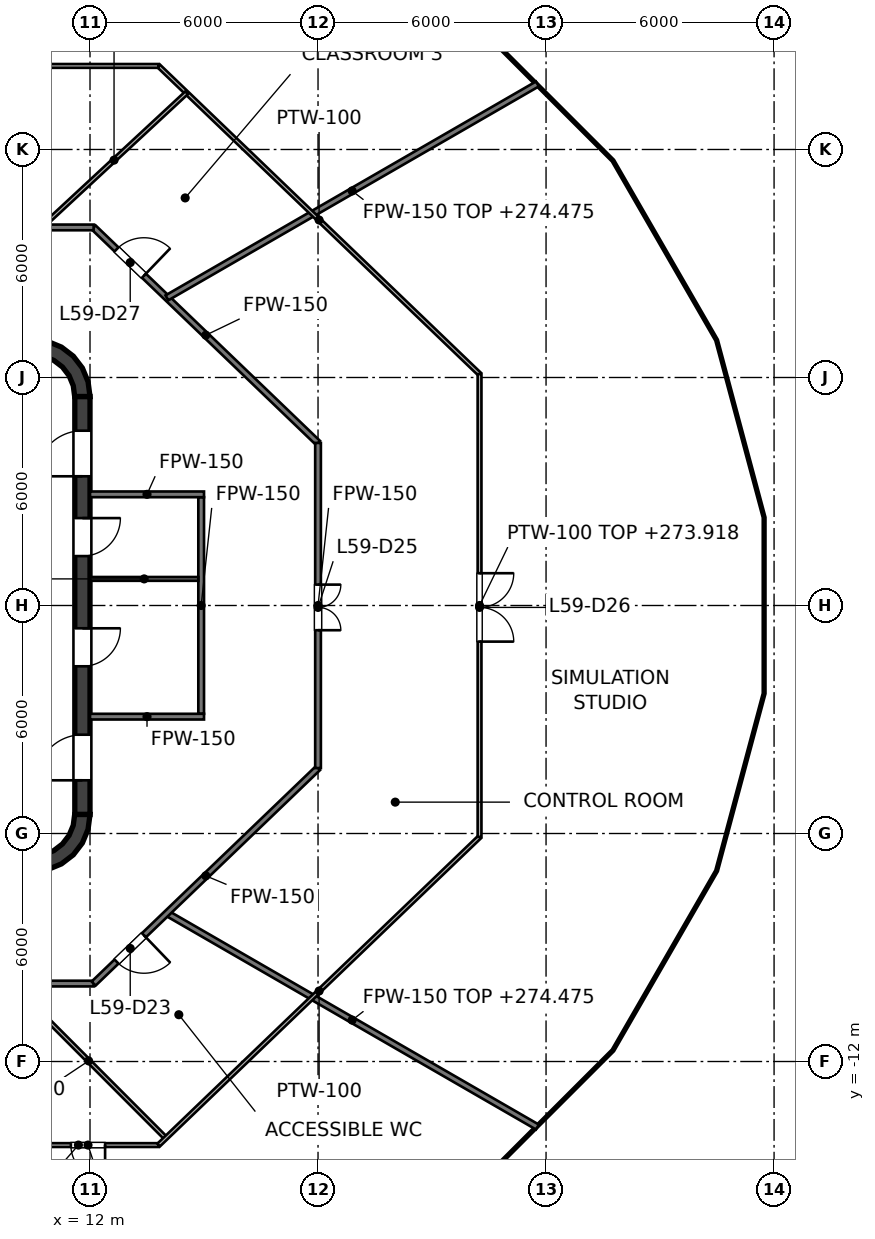
"""IFC4 building model, lengths in metres.
Left out: names, types, materials, properties, quantities, classifications, styles, units other than length and angle.
Written with IfcOpenShell. Run it as: python <this file> out.ifc"""

import sys

from ifc_helpers import new_model, si_unit, direction, frame, frame_2d, origin, place, context, subcontext, project, spatial, polyline, rectangle, outline, extrude, element, fill, save


model = new_model("IFC4")
c1 = context("Model", 3, precision=1e-05, world=origin(), true_north=direction((0.0, 1.0)))
c2 = subcontext(c1, "Body", "Model", "MODEL_VIEW")
j1 = project(units=[si_unit("LENGTHUNIT", "METRE"), si_unit("PLANEANGLEUNIT", "RADIAN")], contexts=[c1])
p1 = place(None, origin())
s1 = spatial("IfcSite", under=j1, at=p1, CompositionType="ELEMENT")
p2 = place(p1, origin())
s2 = spatial("IfcBuilding", under=s1, at=p2, CompositionType="ELEMENT")
p3 = place(p2, frame((0.0, 0.0, 271.0)))
s3 = spatial("IfcBuildingStorey", under=s2, at=p3, CompositionType="ELEMENT", Elevation=271.0)
p4 = place(p3, frame((11.8, -5.5, 0.0), z_axis=(0.0, 0.0, 1.0), x_axis=(0.0, 1.0, 0.0)))
e1 = element("IfcWall", 1, at=p4, inside=s3, PredefinedType="SHEAR", context=c2, shape_type="SweptSolid", body=[
    extrude(rectangle(XDim=11.0, YDim=0.4, at=frame_2d((5.5, 0.0))), origin(), (0.0, 0.0, 1.0), 4.0),
])
p5 = place(p4, frame((3.9, 0.0, 0.0)))
e2 = element("IfcOpeningElement", 2, at=p5, cuts=e1, PredefinedType="OPENING", context=c2, shape_type="SweptSolid", body=[
    extrude(rectangle(XDim=1.0, YDim=2.1, at=frame_2d((0.5, 1.05))), frame((0.0, 0.2, 0.0), z_axis=(0.0, -1.0, 0.0), x_axis=(1.0, 0.0, 0.0)), (0.0, 0.0, 1.0), 0.4),
])
p6 = place(p4, frame((6.8, 0.0, 0.0)))
e3 = element("IfcOpeningElement", 3, at=p6, cuts=e1, PredefinedType="OPENING", context=c2, shape_type="SweptSolid", body=[
    extrude(rectangle(XDim=1.0, YDim=2.1, at=frame_2d((0.5, 1.05))), frame((0.0, 0.2, 0.0), z_axis=(0.0, -1.0, 0.0), x_axis=(1.0, 0.0, 0.0)), (0.0, 0.0, 1.0), 0.4),
])
p7 = place(p4, frame((0.9, 0.0, 0.0)))
e4 = element("IfcOpeningElement", 4, at=p7, cuts=e1, PredefinedType="OPENING", context=c2, shape_type="SweptSolid", body=[
    extrude(rectangle(XDim=1.2, YDim=2.1, at=frame_2d((0.6, 1.05))), frame((0.0, 0.2, 0.0), z_axis=(0.0, -1.0, 0.0), x_axis=(1.0, 0.0, 0.0)), (0.0, 0.0, 1.0), 0.4),
])
p8 = place(p4, frame((8.9, 0.0, 0.0)))
e5 = element("IfcOpeningElement", 5, at=p8, cuts=e1, PredefinedType="OPENING", context=c2, shape_type="SweptSolid", body=[
    extrude(rectangle(XDim=1.2, YDim=2.1, at=frame_2d((0.6, 1.05))), frame((0.0, 0.2, 0.0), z_axis=(0.0, -1.0, 0.0), x_axis=(1.0, 0.0, 0.0)), (0.0, 0.0, 1.0), 0.4),
])
p9 = place(p3, origin())
e6 = element("IfcWall", 6, at=p9, inside=s3, PredefinedType="SHEAR", context=c2, shape_type="SweptSolid", body=[
    extrude(outline(polyline([(10.5, 7.0), (10.5, 6.596), (10.784, 6.559), (11.048, 6.45), (11.275, 6.275), (11.45, 6.048), (11.559, 5.784), (11.596, 5.5), (12.0, 5.5), (11.949, 5.888), (11.799, 6.25), (11.561, 6.561), (11.25, 6.799), (10.888, 6.949), (10.5, 7.0)])), origin(), (0.0, 0.0, 1.0), 4.0),
])
e7 = element("IfcWall", 7, at=p9, inside=s3, PredefinedType="SHEAR", context=c2, shape_type="SweptSolid", body=[
    extrude(outline(polyline([(12.0, -5.5), (11.596, -5.5), (11.559, -5.784), (11.45, -6.048), (11.275, -6.275), (11.048, -6.45), (10.784, -6.559), (10.5, -6.596), (10.5, -7.0), (10.888, -6.949), (11.25, -6.799), (11.561, -6.561), (11.799, -6.25), (11.949, -5.888), (12.0, -5.5)])), origin(), (0.0, 0.0, 1.0), 4.0),
])
p10 = place(p3, frame((14.925, -2.85, 0.0), z_axis=(0.0, 0.0, 1.0), x_axis=(0.0, 1.0, 0.0)))
e8 = element("IfcWall", 8, at=p10, inside=s3, PredefinedType="PARTITIONING", context=c2, shape_type="SweptSolid", body=[
    extrude(rectangle(XDim=5.7, YDim=0.15, at=frame_2d((2.85, 0.0))), origin(), (0.0, 0.0, 1.0), 2.918),
])
for number, where, z_axis, x_axis in (
    (9, (12.0, 2.925, 0.0), (0.0, 0.0, 1.0), (1.0, 0.0, 0.0)),
    (10, (12.0, -2.925, 0.0), (0.0, 0.0, 1.0), (1.0, 0.0, 0.0)),
):
    element("IfcWall", number, at=place(p3, frame(where, z_axis=z_axis, x_axis=x_axis)), inside=s3, PredefinedType="PARTITIONING", context=c2, shape_type="SweptSolid", body=[
        extrude(rectangle(XDim=3.0, YDim=0.15, at=frame_2d((1.5, 0.0))), origin(), (0.0, 0.0, 1.0), 2.918),
    ])
p11 = place(p3, frame((12.0, 0.7, 0.0), z_axis=(0.0, 0.0, 1.0), x_axis=(1.0, 0.0, 0.0)))
e11 = element("IfcWall", 11, at=p11, inside=s3, PredefinedType="PARTITIONING", context=c2, shape_type="SweptSolid", body=[
    extrude(rectangle(XDim=2.85, YDim=0.1, at=frame_2d((1.425, 0.0))), origin(), (0.0, 0.0, 1.0), 3.85),
])
p12 = place(p3, frame((12.095, 9.949, 0.0), z_axis=(0.0, 0.0, 1.0), x_axis=(0.721260976692, -0.69266341285, 0.0)))
e12 = element("IfcWall", 12, at=p12, inside=s3, PredefinedType="PARTITIONING", context=c2, shape_type="SweptSolid", body=[
    extrude(rectangle(XDim=8.187, YDim=0.15, at=frame_2d((4.094, 0.0))), origin(), (0.0, 0.0, 1.0), 2.918),
])
p13 = place(p12, frame((0.835, 0.0, 0.0)))
e13 = element("IfcOpeningElement", 13, at=p13, cuts=e12, PredefinedType="OPENING", context=c2, shape_type="SweptSolid", body=[
    extrude(rectangle(XDim=1.0, YDim=2.1, at=frame_2d((0.5, 1.05))), frame((0.0, 0.075, 0.0), z_axis=(0.0, -1.0, 0.0), x_axis=(1.0, 0.0, 0.0)), (0.0, 0.0, 1.0), 0.15),
])
p14 = place(p3, frame((14.024, -8.096, 0.0), z_axis=(0.0, 0.0, 1.0), x_axis=(0.866020158842, -0.500009084397, 0.0)))
e14 = element("IfcWall", 14, at=p14, inside=s3, PredefinedType="PARTITIONING", context=c2, shape_type="SweptSolid", body=[
    extrude(rectangle(XDim=11.256, YDim=0.15, at=frame_2d((5.628, 0.0))), origin(), (0.0, 0.0, 1.0), 3.475),
])
p15 = place(p3, frame((-12.095, -9.949, 0.0), z_axis=(0.0, 0.0, 1.0), x_axis=(1.0, 0.0, 0.0)))
e15 = element("IfcWall", 15, at=p15, inside=s3, PredefinedType="PARTITIONING", context=c2, shape_type="SweptSolid", body=[
    extrude(rectangle(XDim=24.19, YDim=0.15, at=frame_2d((12.095, 0.0))), origin(), (0.0, 0.0, 1.0), 2.927),
])
p16 = place(p15, frame((4.215, 0.0, 0.0)))
e16 = element("IfcOpeningElement", 16, at=p16, cuts=e15, PredefinedType="OPENING", context=c2, shape_type="SweptSolid", body=[
    extrude(rectangle(XDim=1.0, YDim=2.1, at=frame_2d((0.5, 1.05))), frame((0.0, 0.075, 0.0), z_axis=(0.0, -1.0, 0.0), x_axis=(1.0, 0.0, 0.0)), (0.0, 0.0, 1.0), 0.15),
])
p17 = place(p15, frame((10.029, 0.0, 0.0)))
e17 = element("IfcOpeningElement", 17, at=p17, cuts=e15, PredefinedType="OPENING", context=c2, shape_type="SweptSolid", body=[
    extrude(rectangle(XDim=1.0, YDim=2.1, at=frame_2d((0.5, 1.05))), frame((0.0, 0.075, 0.0), z_axis=(0.0, -1.0, 0.0), x_axis=(1.0, 0.0, 0.0)), (0.0, 0.0, 1.0), 0.15),
])
p18 = place(p15, frame((16.398, 0.0, 0.0)))
e18 = element("IfcOpeningElement", 18, at=p18, cuts=e15, PredefinedType="OPENING", context=c2, shape_type="SweptSolid", body=[
    extrude(rectangle(XDim=1.0, YDim=2.1, at=frame_2d((0.5, 1.05))), frame((0.0, 0.075, 0.0), z_axis=(0.0, -1.0, 0.0), x_axis=(1.0, 0.0, 0.0)), (0.0, 0.0, 1.0), 0.15),
])
p19 = place(p3, frame((-12.095, 9.949, 0.0), z_axis=(0.0, 0.0, 1.0), x_axis=(1.0, 0.0, 0.0)))
e19 = element("IfcWall", 19, at=p19, inside=s3, PredefinedType="PARTITIONING", context=c2, shape_type="SweptSolid", body=[
    extrude(rectangle(XDim=24.19, YDim=0.15, at=frame_2d((12.095, 0.0))), origin(), (0.0, 0.0, 1.0), 2.927),
])
p20 = place(p19, frame((20.297, 0.0, 0.0)))
e20 = element("IfcOpeningElement", 20, at=p20, cuts=e19, PredefinedType="OPENING", context=c2, shape_type="SweptSolid", body=[
    extrude(rectangle(XDim=1.0, YDim=2.1, at=frame_2d((0.5, 1.05))), frame((0.0, 0.075, 0.0), z_axis=(0.0, -1.0, 0.0), x_axis=(1.0, 0.0, 0.0)), (0.0, 0.0, 1.0), 0.15),
])
p21 = place(p19, frame((16.27, 0.0, 0.0)))
e21 = element("IfcOpeningElement", 21, at=p21, cuts=e19, PredefinedType="OPENING", context=c2, shape_type="SweptSolid", body=[
    extrude(rectangle(XDim=1.0, YDim=2.1, at=frame_2d((0.5, 1.05))), frame((0.0, 0.075, 0.0), z_axis=(0.0, -1.0, 0.0), x_axis=(1.0, 0.0, 0.0)), (0.0, 0.0, 1.0), 0.15),
])
p22 = place(p19, frame((12.14, 0.0, 0.0)))
e22 = element("IfcOpeningElement", 22, at=p22, cuts=e19, PredefinedType="OPENING", context=c2, shape_type="SweptSolid", body=[
    extrude(rectangle(XDim=1.0, YDim=2.1, at=frame_2d((0.5, 1.05))), frame((0.0, 0.075, 0.0), z_axis=(0.0, -1.0, 0.0), x_axis=(1.0, 0.0, 0.0)), (0.0, 0.0, 1.0), 0.15),
])
p23 = place(p19, frame((5.782, 0.0, 0.0)))
e23 = element("IfcOpeningElement", 23, at=p23, cuts=e19, PredefinedType="OPENING", context=c2, shape_type="SweptSolid", body=[
    extrude(rectangle(XDim=1.0, YDim=2.1, at=frame_2d((0.5, 1.05))), frame((0.0, 0.075, 0.0), z_axis=(0.0, -1.0, 0.0), x_axis=(1.0, 0.0, 0.0)), (0.0, 0.0, 1.0), 0.15),
])
p24 = place(p3, frame((14.024, 8.096, 0.0), z_axis=(0.0, 0.0, 1.0), x_axis=(0.866020158842, 0.500009084397, 0.0)))
e24 = element("IfcWall", 24, at=p24, inside=s3, PredefinedType="PARTITIONING", context=c2, shape_type="SweptSolid", body=[
    extrude(rectangle(XDim=11.256, YDim=0.15, at=frame_2d((5.628, 0.0))), origin(), (0.0, 0.0, 1.0), 3.475),
])
p25 = place(p3, frame((12.095, -9.949, 0.0), z_axis=(0.0, 0.0, 1.0), x_axis=(0.721246078931, 0.692678925352, 0.0)))
e25 = element("IfcWall", 25, at=p25, inside=s3, PredefinedType="PARTITIONING", context=c2, shape_type="SweptSolid", body=[
    extrude(rectangle(XDim=8.187, YDim=0.15, at=frame_2d((4.094, 0.0))), origin(), (0.0, 0.0, 1.0), 2.918),
])
p26 = place(p25, frame((0.836, 0.0, 0.0)))
e26 = element("IfcOpeningElement", 26, at=p26, cuts=e25, PredefinedType="OPENING", context=c2, shape_type="SweptSolid", body=[
    extrude(rectangle(XDim=1.0, YDim=2.1, at=frame_2d((0.5, 1.05))), frame((0.0, 0.075, 0.0), z_axis=(0.0, -1.0, 0.0), x_axis=(1.0, 0.0, 0.0)), (0.0, 0.0, 1.0), 0.15),
])
p27 = place(p3, frame((18.0, -4.278, 0.0), z_axis=(0.0, 0.0, 1.0), x_axis=(0.0, 1.0, 0.0)))
e27 = element("IfcWall", 27, at=p27, inside=s3, PredefinedType="PARTITIONING", context=c2, shape_type="SweptSolid", body=[
    extrude(rectangle(XDim=8.556, YDim=0.15, at=frame_2d((4.278, 0.0))), origin(), (0.0, 0.0, 1.0), 2.918),
])
p28 = place(p27, frame((3.627, 0.0, 0.0)))
e28 = element("IfcOpeningElement", 28, at=p28, cuts=e27, PredefinedType="OPENING", context=c2, shape_type="SweptSolid", body=[
    extrude(rectangle(XDim=1.2, YDim=2.1, at=frame_2d((0.6, 1.05))), frame((0.0, 0.075, 0.0), z_axis=(0.0, -1.0, 0.0), x_axis=(1.0, 0.0, 0.0)), (0.0, 0.0, 1.0), 0.15),
])
p29 = place(p3, frame((9.94, -14.255, 0.0), z_axis=(0.0, 0.0, 1.0), x_axis=(0.571993311717, -0.820258283318, 0.0)))
e29 = element("IfcWall", 29, at=p29, inside=s3, PredefinedType="PARTITIONING", context=c2, shape_type="SweptSolid", body=[
    extrude(rectangle(XDim=7.444, YDim=0.05, at=frame_2d((3.722, 0.0))), origin(), (0.0, 0.0, 1.0), 2.927),
])
p30 = place(p3, frame((9.932, -9.949, 0.0), z_axis=(0.0, 0.0, 1.0), x_axis=(0.70649080711, -0.707722219143, 0.0)))
e30 = element("IfcWall", 30, at=p30, inside=s3, PredefinedType="PARTITIONING", context=c2, shape_type="SweptSolid", body=[
    extrude(rectangle(XDim=5.75, YDim=0.1, at=frame_2d((2.875, 0.0))), origin(), (0.0, 0.0, 1.0), 3.85),
])
p31 = place(p3, frame((13.805, 14.199, 0.0), z_axis=(0.0, 0.0, 1.0), x_axis=(0.721317314508, -0.692604744274, 0.0)))
e31 = element("IfcWall", 31, at=p31, inside=s3, PredefinedType="PARTITIONING", context=c2, shape_type="SweptSolid", body=[
    extrude(rectangle(XDim=11.708, YDim=0.1, at=frame_2d((5.854, 0.0))), origin(), (0.0, 0.0, 1.0), 2.927),
])
p32 = place(p3, frame((9.584, -14.199, 0.0), z_axis=(0.0, 0.0, 1.0), x_axis=(1.0, 0.0, 0.0)))
e32 = element("IfcWall", 32, at=p32, inside=s3, PredefinedType="PARTITIONING", context=c2, shape_type="SweptSolid", body=[
    extrude(rectangle(XDim=4.221, YDim=0.1, at=frame_2d((2.11, 0.0))), origin(), (0.0, 0.0, 1.0), 2.927),
])
p33 = place(p32, frame((1.913, 0.0, 0.0)))
e33 = element("IfcOpeningElement", 33, at=p33, cuts=e32, PredefinedType="OPENING", context=c2, shape_type="SweptSolid", body=[
    extrude(rectangle(XDim=0.9, YDim=2.1, at=frame_2d((0.45, 1.05))), frame((0.0, 0.05, 0.0), z_axis=(0.0, -1.0, 0.0), x_axis=(1.0, 0.0, 0.0)), (0.0, 0.0, 1.0), 0.1),
])
p34 = place(p3, frame((-13.805, 14.199, 0.0), z_axis=(0.0, 0.0, 1.0), x_axis=(1.0, 0.0, 0.0)))
e34 = element("IfcWall", 34, at=p34, inside=s3, PredefinedType="PARTITIONING", context=c2, shape_type="SweptSolid", body=[
    extrude(rectangle(XDim=27.61, YDim=0.1, at=frame_2d((13.805, 0.0))), origin(), (0.0, 0.0, 1.0), 2.927),
])
p35 = place(p34, frame((20.047, 0.0, 0.0)))
e35 = element("IfcOpeningElement", 35, at=p35, cuts=e34, PredefinedType="OPENING", context=c2, shape_type="SweptSolid", body=[
    extrude(rectangle(XDim=0.9, YDim=2.1, at=frame_2d((0.45, 1.05))), frame((0.0, 0.05, 0.0), z_axis=(0.0, -1.0, 0.0), x_axis=(1.0, 0.0, 0.0)), (0.0, 0.0, 1.0), 0.1),
])
p36 = place(p34, frame((4.928, 0.0, 0.0)))
e36 = element("IfcOpeningElement", 36, at=p36, cuts=e34, PredefinedType="OPENING", context=c2, shape_type="SweptSolid", body=[
    extrude(rectangle(XDim=1.8, YDim=2.1, at=frame_2d((0.9, 1.05))), frame((0.0, 0.05, 0.0), z_axis=(0.0, -1.0, 0.0), x_axis=(1.0, 0.0, 0.0)), (0.0, 0.0, 1.0), 0.1),
])
p37 = place(p3, frame((10.723, 9.949, 0.0), z_axis=(0.0, 0.0, 1.0), x_axis=(0.733112222909, 0.680107688989, 0.0)))
e37 = element("IfcWall", 37, at=p37, inside=s3, PredefinedType="PARTITIONING", context=c2, shape_type="SweptSolid", body=[
    extrude(rectangle(XDim=5.209, YDim=0.1, at=frame_2d((2.605, 0.0))), origin(), (0.0, 0.0, 1.0), 3.85),
])
p38 = place(p3, frame((13.805, -14.199, 0.0), z_axis=(0.0, 0.0, 1.0), x_axis=(0.721419404794, 0.692498406053, 0.0)))
e38 = element("IfcWall", 38, at=p38, inside=s3, PredefinedType="PARTITIONING", context=c2, shape_type="SweptSolid", body=[
    extrude(rectangle(XDim=11.708, YDim=0.1, at=frame_2d((5.854, 0.0))), origin(), (0.0, 0.0, 1.0), 2.927),
])
p39 = place(p3, frame((22.25, -6.089, 0.0), z_axis=(0.0, 0.0, 1.0), x_axis=(0.0, 1.0, 0.0)))
e39 = element("IfcWall", 39, at=p39, inside=s3, PredefinedType="PARTITIONING", context=c2, shape_type="SweptSolid", body=[
    extrude(rectangle(XDim=12.178, YDim=0.1, at=frame_2d((6.089, 0.0))), origin(), (0.0, 0.0, 1.0), 2.918),
])
p40 = place(p39, frame((5.139, 0.0, 0.0)))
e40 = element("IfcOpeningElement", 40, at=p40, cuts=e39, PredefinedType="OPENING", context=c2, shape_type="SweptSolid", body=[
    extrude(rectangle(XDim=1.8, YDim=2.1, at=frame_2d((0.9, 1.05))), frame((0.0, 0.05, 0.0), z_axis=(0.0, -1.0, 0.0), x_axis=(1.0, 0.0, 0.0)), (0.0, 0.0, 1.0), 0.1),
])
p41 = place(p5, origin())
e41 = element("IfcDoor", 41, at=p41, inside=s3, OperationType="SINGLE_SWING_RIGHT", PredefinedType="DOOR", context=c2, shape_type="SweptSolid", body=[
    extrude(rectangle(XDim=1.0, YDim=2.1, at=frame_2d((0.5, 1.05))), frame((0.0, 0.025, 0.0), z_axis=(0.0, -1.0, 0.0), x_axis=(1.0, 0.0, 0.0)), (0.0, 0.0, 1.0), 0.05),
])
fill(e2, e41)
p42 = place(p6, origin())
e42 = element("IfcDoor", 42, at=p42, inside=s3, OperationType="SINGLE_SWING_RIGHT", PredefinedType="DOOR", context=c2, shape_type="SweptSolid", body=[
    extrude(rectangle(XDim=1.0, YDim=2.1, at=frame_2d((0.5, 1.05))), frame((0.0, 0.025, 0.0), z_axis=(0.0, -1.0, 0.0), x_axis=(1.0, 0.0, 0.0)), (0.0, 0.0, 1.0), 0.05),
])
fill(e3, e42)
p43 = place(p7, origin())
e43 = element("IfcDoor", 43, at=p43, inside=s3, OperationType="SINGLE_SWING_LEFT", PredefinedType="DOOR", context=c2, shape_type="SweptSolid", body=[
    extrude(rectangle(XDim=1.2, YDim=2.1, at=frame_2d((0.6, 1.05))), frame((0.0, 0.025, 0.0), z_axis=(0.0, -1.0, 0.0), x_axis=(1.0, 0.0, 0.0)), (0.0, 0.0, 1.0), 0.05),
])
fill(e4, e43)
p44 = place(p8, origin())
e44 = element("IfcDoor", 44, at=p44, inside=s3, OperationType="SINGLE_SWING_LEFT", PredefinedType="DOOR", context=c2, shape_type="SweptSolid", body=[
    extrude(rectangle(XDim=1.2, YDim=2.1, at=frame_2d((0.6, 1.05))), frame((0.0, 0.025, 0.0), z_axis=(0.0, -1.0, 0.0), x_axis=(1.0, 0.0, 0.0)), (0.0, 0.0, 1.0), 0.05),
])
fill(e5, e44)
p45 = place(p26, origin())
e45 = element("IfcDoor", 45, at=p45, inside=s3, OperationType="SINGLE_SWING_RIGHT", PredefinedType="DOOR", context=c2, shape_type="SweptSolid", body=[
    extrude(rectangle(XDim=1.0, YDim=2.1, at=frame_2d((0.5, 1.05))), frame((0.0, 0.025, 0.0), z_axis=(0.0, -1.0, 0.0), x_axis=(1.0, 0.0, 0.0)), (0.0, 0.0, 1.0), 0.05),
])
fill(e26, e45)
p46 = place(p33, origin())
e46 = element("IfcDoor", 46, at=p46, inside=s3, OperationType="SINGLE_SWING_RIGHT", PredefinedType="DOOR", context=c2, shape_type="SweptSolid", body=[
    extrude(rectangle(XDim=0.9, YDim=2.1, at=frame_2d((0.45, 1.05))), frame((0.0, 0.025, 0.0), z_axis=(0.0, -1.0, 0.0), x_axis=(1.0, 0.0, 0.0)), (0.0, 0.0, 1.0), 0.05),
])
fill(e33, e46)
p47 = place(p28, origin())
e47 = element("IfcDoor", 47, at=p47, inside=s3, OperationType="DOUBLE_DOOR_SINGLE_SWING", PredefinedType="DOOR", context=c2, shape_type="SweptSolid", body=[
    extrude(rectangle(XDim=1.2, YDim=2.1, at=frame_2d((0.6, 1.05))), frame((0.0, 0.025, 0.0), z_axis=(0.0, -1.0, 0.0), x_axis=(1.0, 0.0, 0.0)), (0.0, 0.0, 1.0), 0.05),
])
fill(e28, e47)
p48 = place(p40, origin())
e48 = element("IfcDoor", 48, at=p48, inside=s3, OperationType="DOUBLE_DOOR_SINGLE_SWING", PredefinedType="DOOR", context=c2, shape_type="SweptSolid", body=[
    extrude(rectangle(XDim=1.8, YDim=2.1, at=frame_2d((0.9, 1.05))), frame((0.0, 0.025, 0.0), z_axis=(0.0, -1.0, 0.0), x_axis=(1.0, 0.0, 0.0)), (0.0, 0.0, 1.0), 0.05),
])
fill(e40, e48)
p49 = place(p13, origin())
e49 = element("IfcDoor", 49, at=p49, inside=s3, OperationType="SINGLE_SWING_RIGHT", PredefinedType="DOOR", context=c2, shape_type="SweptSolid", body=[
    extrude(rectangle(XDim=1.0, YDim=2.1, at=frame_2d((0.5, 1.05))), frame((0.0, 0.025, 0.0), z_axis=(0.0, -1.0, 0.0), x_axis=(1.0, 0.0, 0.0)), (0.0, 0.0, 1.0), 0.05),
])
fill(e13, e49)
save(model, sys.argv[1])
